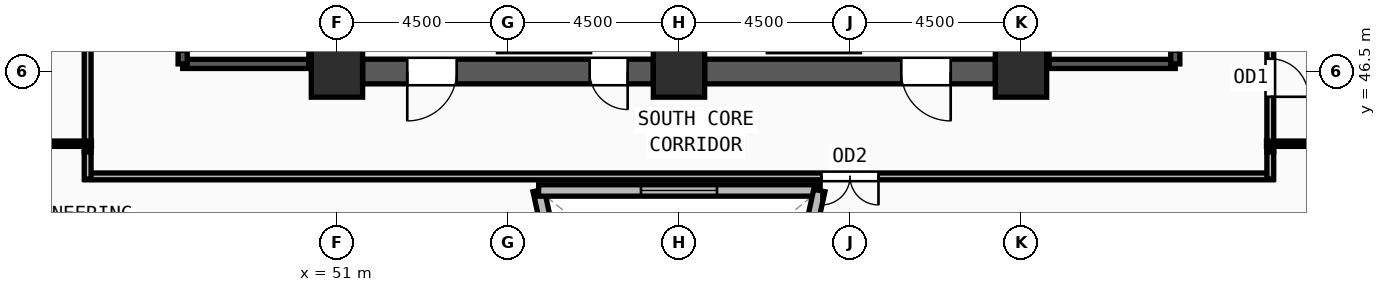
"""IFC4 building model, lengths in metres.
Left out: names, types, materials, properties, quantities, classifications, styles, units other than length and angle.
Written with IfcOpenShell. Run it as: python <this file> out.ifc"""

import sys

from ifc_helpers import new_model, si_unit, direction, frame, frame_2d, origin, origin_2d, place, context, subcontext, project, spatial, rectangle, extrude, source, transform, mapped, element, fill, save


model = new_model("IFC4")
c1 = context("Model", 3, precision=1e-05, world=origin(), true_north=direction((0.0, 1.0)))
c2 = subcontext(c1, "Body", "Model", "MODEL_VIEW")
j1 = project(units=[si_unit("LENGTHUNIT", "METRE"), si_unit("PLANEANGLEUNIT", "RADIAN")], contexts=[c1])
p1 = place(None, origin())
s1 = spatial("IfcSite", under=j1, at=p1, CompositionType="ELEMENT")
p2 = place(p1, origin())
s2 = spatial("IfcBuilding", under=s1, at=p2, CompositionType="ELEMENT")
p3 = place(p2, frame((0.0, 0.0, 236.25)))
s3 = spatial("IfcBuildingStorey", under=s2, at=p3, CompositionType="ELEMENT", Elevation=236.25)
m1 = source(origin(), c2, "Body", "SweptSolid", [
    extrude(rectangle(XDim=1.35, YDim=1.35, at=origin_2d()), origin(), (0.0, 0.0, 1.0), 3.75),
])
for number, where, z_axis, x_axis in (
    (1, (51.0, 46.5, 0.0), (0.0, 0.0, 1.0), (1.0, 0.0, 0.0)),
    (2, (60.0, 46.5, 0.0), (0.0, 0.0, 1.0), (1.0, 0.0, 0.0)),
    (3, (69.0, 46.5, 0.0), (0.0, 0.0, 1.0), (1.0, 0.0, 0.0)),
):
    element("IfcColumn", number, at=place(p3, frame(where, z_axis=z_axis, x_axis=x_axis)), inside=s3, PredefinedType="COLUMN", context=c2, shape_type="MappedRepresentation", body=[
        mapped(m1, transform((0.0, 0.0, 0.0), x_axis=(1.0, 0.0, 0.0), y_axis=(0.0, 1.0, 0.0), z_axis=(0.0, 0.0, 1.0), scale=1.0)),
    ])
p4 = place(p3, frame((38.641, 43.835, 0.0), z_axis=(0.0, 0.0, 1.0), x_axis=(0.553942197413, -0.83255512846, 0.0)))
e4 = element("IfcWall", 4, at=p4, inside=s3, PredefinedType="SOLIDWALL", context=c2, shape_type="SweptSolid", body=[
    extrude(rectangle(XDim=28.402, YDim=0.38, at=frame_2d((14.201, 0.0))), origin(), (0.0, 0.0, 1.0), 3.57),
])
m2 = source(origin(), c2, "Body", "SweptSolid", [
    extrude(rectangle(XDim=1.5, YDim=1.9, at=frame_2d((0.75, 0.95))), frame((0.0, 0.2, 0.0), z_axis=(0.0, -1.0, 0.0), x_axis=(1.0, 0.0, 0.0)), (0.0, 0.0, 1.0), 0.4),
])
p5 = place(p4, frame((6.35, 0.0, 0.55)))
e5 = element("IfcOpeningElement", 5, at=p5, cuts=e4, PredefinedType="OPENING", context=c2, shape_type="MappedRepresentation", body=[
    mapped(m2, transform((0.0, 0.0, 0.0), x_axis=(1.0, 0.0, 0.0), y_axis=(0.0, 1.0, 0.0), z_axis=(0.0, 0.0, 1.0), scale=1.0)),
])
p6 = place(p4, frame((13.451, 0.0, 0.55)))
e6 = element("IfcOpeningElement", 6, at=p6, cuts=e4, PredefinedType="OPENING", context=c2, shape_type="MappedRepresentation", body=[
    mapped(m2, transform((0.0, 0.0, 0.0), x_axis=(1.0, 0.0, 0.0), y_axis=(0.0, 1.0, 0.0), z_axis=(0.0, 0.0, 1.0), scale=1.0)),
])
p7 = place(p4, frame((20.551, 0.0, 0.55)))
e7 = element("IfcOpeningElement", 7, at=p7, cuts=e4, PredefinedType="OPENING", context=c2, shape_type="MappedRepresentation", body=[
    mapped(m2, transform((0.0, 0.0, 0.0), x_axis=(1.0, 0.0, 0.0), y_axis=(0.0, 1.0, 0.0), z_axis=(0.0, 0.0, 1.0), scale=1.0)),
])
p8 = place(p3, frame((68.325, 46.5, 0.0), z_axis=(0.0, 0.0, 1.0), x_axis=(-1.0, 0.0, 0.0)))
e8 = element("IfcWall", 8, at=p8, inside=s3, PredefinedType="SHEAR", context=c2, shape_type="SweptSolid", body=[
    extrude(rectangle(XDim=7.65, YDim=0.65, at=frame_2d((3.825, 0.0))), origin(), (0.0, 0.0, 1.0), 3.57),
])
m3 = source(origin(), c2, "Body", "SweptSolid", [
    extrude(rectangle(XDim=1.3, YDim=2.2, at=frame_2d((0.65, 1.1))), frame((0.0, 0.335, 0.0), z_axis=(0.0, -1.0, 0.0), x_axis=(1.0, 0.0, 0.0)), (0.0, 0.0, 1.0), 0.67),
])
p9 = place(p8, frame((1.175, 0.0, 0.0)))
e9 = element("IfcOpeningElement", 9, at=p9, cuts=e8, PredefinedType="OPENING", context=c2, shape_type="MappedRepresentation", body=[
    mapped(m3, transform((0.0, 0.0, 0.0), x_axis=(1.0, 0.0, 0.0), y_axis=(0.0, 1.0, 0.0), z_axis=(0.0, 0.0, 1.0), scale=1.0)),
])
p10 = place(p3, frame((59.325, 46.5, 0.0), z_axis=(0.0, 0.0, 1.0), x_axis=(-1.0, 0.0, 0.0)))
e10 = element("IfcWall", 10, at=p10, inside=s3, PredefinedType="SHEAR", context=c2, shape_type="SweptSolid", body=[
    extrude(rectangle(XDim=7.65, YDim=0.65, at=frame_2d((3.825, 0.0))), origin(), (0.0, 0.0, 1.0), 3.57),
])
p11 = place(p10, frame((5.175, 0.0, 0.0)))
e11 = element("IfcOpeningElement", 11, at=p11, cuts=e10, PredefinedType="OPENING", context=c2, shape_type="MappedRepresentation", body=[
    mapped(m3, transform((0.0, 0.0, 0.0), x_axis=(1.0, 0.0, 0.0), y_axis=(0.0, 1.0, 0.0), z_axis=(0.0, 0.0, 1.0), scale=1.0)),
])
m4 = source(origin(), c2, "Body", "SweptSolid", [
    extrude(rectangle(XDim=1.0, YDim=2.2, at=frame_2d((0.5, 1.1))), frame((0.0, 0.335, 0.0), z_axis=(0.0, -1.0, 0.0), x_axis=(1.0, 0.0, 0.0)), (0.0, 0.0, 1.0), 0.67),
])
p12 = place(p10, frame((0.675, 0.0, 0.0)))
e12 = element("IfcOpeningElement", 12, at=p12, cuts=e10, PredefinedType="OPENING", context=c2, shape_type="MappedRepresentation", body=[
    mapped(m4, transform((0.0, 0.0, 0.0), x_axis=(1.0, 0.0, 0.0), y_axis=(0.0, 1.0, 0.0), z_axis=(0.0, 0.0, 1.0), scale=1.0)),
])
p13 = place(p3, frame((46.94, 46.7, 0.0), z_axis=(0.0, 0.0, 1.0), x_axis=(1.0, 0.0, 0.0)))
e13 = element("IfcWall", 13, at=p13, inside=s3, PredefinedType="SOLIDWALL", context=c2, shape_type="SweptSolid", body=[
    extrude(rectangle(XDim=3.44, YDim=0.24, at=frame_2d((1.72, 0.0))), origin(), (0.0, 0.0, 1.0), 3.57),
])
p14 = place(p3, frame((50.38, 46.7, 0.0), z_axis=(0.0, 0.0, 1.0), x_axis=(0.0, 1.0, 0.0)))
e14 = element("IfcWall", 14, at=p14, inside=s3, PredefinedType="SOLIDWALL", context=c2, shape_type="SweptSolid", body=[
    extrude(rectangle(XDim=7.82, YDim=0.24, at=frame_2d((3.91, 0.0))), origin(), (0.0, 0.0, 1.0), 3.57),
])
p15 = place(p3, frame((46.94, 54.52, 0.0), z_axis=(0.0, 0.0, 1.0), x_axis=(0.0, -1.0, 0.0)))
e15 = element("IfcWall", 15, at=p15, inside=s3, PredefinedType="SOLIDWALL", context=c2, shape_type="SweptSolid", body=[
    extrude(rectangle(XDim=7.82, YDim=0.24, at=frame_2d((3.91, 0.0))), origin(), (0.0, 0.0, 1.0), 3.57),
])
m5 = source(origin(), c2, "Body", "SweptSolid", [
    extrude(rectangle(XDim=1.2, YDim=2.2, at=frame_2d((0.6, 1.1))), frame((0.0, 0.13, 0.0), z_axis=(0.0, -1.0, 0.0), x_axis=(1.0, 0.0, 0.0)), (0.0, 0.0, 1.0), 0.26),
])
p16 = place(p15, frame((6.3, 0.0, 0.0)))
e16 = element("IfcOpeningElement", 16, at=p16, cuts=e15, PredefinedType="OPENING", context=c2, shape_type="MappedRepresentation", body=[
    mapped(m5, transform((0.0, 0.0, 0.0), x_axis=(1.0, 0.0, 0.0), y_axis=(0.0, 1.0, 0.0), z_axis=(0.0, 0.0, 1.0), scale=1.0)),
])
p17 = place(p3, frame((69.62, 46.7, 0.0), z_axis=(0.0, 0.0, 1.0), x_axis=(1.0, 0.0, 0.0)))
e17 = element("IfcWall", 17, at=p17, inside=s3, PredefinedType="SOLIDWALL", context=c2, shape_type="SweptSolid", body=[
    extrude(rectangle(XDim=3.44, YDim=0.24, at=frame_2d((1.72, 0.0))), origin(), (0.0, 0.0, 1.0), 3.57),
])
p18 = place(p3, frame((73.06, 46.7, 0.0), z_axis=(0.0, 0.0, 1.0), x_axis=(0.0, 1.0, 0.0)))
e18 = element("IfcWall", 18, at=p18, inside=s3, PredefinedType="SOLIDWALL", context=c2, shape_type="SweptSolid", body=[
    extrude(rectangle(XDim=7.82, YDim=0.24, at=frame_2d((3.91, 0.0))), origin(), (0.0, 0.0, 1.0), 3.57),
])
p19 = place(p18, frame((0.32, 0.0, 0.0)))
e19 = element("IfcOpeningElement", 19, at=p19, cuts=e18, PredefinedType="OPENING", context=c2, shape_type="MappedRepresentation", body=[
    mapped(m5, transform((0.0, 0.0, 0.0), x_axis=(1.0, 0.0, 0.0), y_axis=(0.0, 1.0, 0.0), z_axis=(0.0, 0.0, 1.0), scale=1.0)),
])
p20 = place(p3, frame((69.62, 54.52, 0.0), z_axis=(0.0, 0.0, 1.0), x_axis=(0.0, -1.0, 0.0)))
e20 = element("IfcWall", 20, at=p20, inside=s3, PredefinedType="SOLIDWALL", context=c2, shape_type="SweptSolid", body=[
    extrude(rectangle(XDim=7.82, YDim=0.24, at=frame_2d((3.91, 0.0))), origin(), (0.0, 0.0, 1.0), 3.57),
])
p21 = place(p3, frame((57.6, 37.393, 0.0), z_axis=(0.0, 0.0, 1.0), x_axis=(-0.211469886749, 0.977384513382, 0.0)))
e21 = element("IfcWall", 21, at=p21, inside=s3, PredefinedType="SOLIDWALL", context=c2, shape_type="SweptSolid", body=[
    extrude(rectangle(XDim=6.115, YDim=0.3, at=frame_2d((3.058, 0.0))), origin(), (0.0, 0.0, 1.0), 3.57),
])
m6 = source(origin(), c2, "Body", "SweptSolid", [
    extrude(rectangle(XDim=2.0, YDim=1.9, at=frame_2d((1.0, 0.95))), frame((0.0, 0.16, 0.0), z_axis=(0.0, -1.0, 0.0), x_axis=(1.0, 0.0, 0.0)), (0.0, 0.0, 1.0), 0.32),
])
p22 = place(p21, frame((2.058, 0.0, 0.55)))
e22 = element("IfcOpeningElement", 22, at=p22, cuts=e21, PredefinedType="OPENING", context=c2, shape_type="MappedRepresentation", body=[
    mapped(m6, transform((0.0, 0.0, 0.0), x_axis=(1.0, 0.0, 0.0), y_axis=(0.0, 1.0, 0.0), z_axis=(0.0, 0.0, 1.0), scale=1.0)),
])
p23 = place(p3, frame((56.307, 43.37, 0.0), z_axis=(0.0, 0.0, 1.0), x_axis=(1.0, 0.0, 0.0)))
e23 = element("IfcWall", 23, at=p23, inside=s3, PredefinedType="SOLIDWALL", context=c2, shape_type="SweptSolid", body=[
    extrude(rectangle(XDim=7.386, YDim=0.3, at=frame_2d((3.693, 0.0))), origin(), (0.0, 0.0, 1.0), 3.57),
])
p24 = place(p23, frame((2.693, 0.0, 0.55)))
e24 = element("IfcOpeningElement", 24, at=p24, cuts=e23, PredefinedType="OPENING", context=c2, shape_type="MappedRepresentation", body=[
    mapped(m6, transform((0.0, 0.0, 0.0), x_axis=(1.0, 0.0, 0.0), y_axis=(0.0, 1.0, 0.0), z_axis=(0.0, 0.0, 1.0), scale=1.0)),
])
p25 = place(p3, frame((63.693, 43.37, 0.0), z_axis=(0.0, 0.0, 1.0), x_axis=(-0.211469886749, -0.977384513382, 0.0)))
e25 = element("IfcWall", 25, at=p25, inside=s3, PredefinedType="SOLIDWALL", context=c2, shape_type="SweptSolid", body=[
    extrude(rectangle(XDim=6.115, YDim=0.3, at=frame_2d((3.058, 0.0))), origin(), (0.0, 0.0, 1.0), 3.57),
])
p26 = place(p25, frame((2.058, 0.0, 0.55)))
e26 = element("IfcOpeningElement", 26, at=p26, cuts=e25, PredefinedType="OPENING", context=c2, shape_type="MappedRepresentation", body=[
    mapped(m6, transform((0.0, 0.0, 0.0), x_axis=(1.0, 0.0, 0.0), y_axis=(0.0, 1.0, 0.0), z_axis=(0.0, 0.0, 1.0), scale=1.0)),
])
p27 = place(p3, frame((75.63, 43.74, 0.0), z_axis=(0.0, 0.0, 1.0), x_axis=(-1.0, 0.0, 0.0)))
e27 = element("IfcWall", 27, at=p27, inside=s3, PredefinedType="PARTITIONING", context=c2, shape_type="SweptSolid", body=[
    extrude(rectangle(XDim=31.26, YDim=0.18, at=frame_2d((15.63, 0.0))), origin(), (0.0, 0.0, 1.0), 3.57),
])
m7 = source(origin(), c2, "Body", "SweptSolid", [
    extrude(rectangle(XDim=1.5, YDim=2.2, at=frame_2d((0.75, 1.1))), frame((0.0, 0.1, 0.0), z_axis=(0.0, -1.0, 0.0), x_axis=(1.0, 0.0, 0.0)), (0.0, 0.0, 1.0), 0.2),
])
p28 = place(p27, frame((10.38, 0.0, 0.0)))
e28 = element("IfcOpeningElement", 28, at=p28, cuts=e27, PredefinedType="OPENING", context=c2, shape_type="MappedRepresentation", body=[
    mapped(m7, transform((0.0, 0.0, 0.0), x_axis=(1.0, 0.0, 0.0), y_axis=(0.0, 1.0, 0.0), z_axis=(0.0, 0.0, 1.0), scale=1.0)),
])
p29 = place(p3, frame((75.56, 48.285, 0.0), z_axis=(0.0, 0.0, 1.0), x_axis=(0.0, -1.0, 0.0)))
e29 = element("IfcWall", 29, at=p29, inside=s3, PredefinedType="PARTITIONING", context=c2, shape_type="SweptSolid", body=[
    extrude(rectangle(XDim=3.9, YDim=0.18, at=frame_2d((1.95, 0.0))), origin(), (0.0, 0.0, 1.0), 3.57),
])
m8 = source(origin(), c2, "Body", "SweptSolid", [
    extrude(rectangle(XDim=1.0, YDim=2.2, at=frame_2d((0.5, 1.1))), frame((0.0, 0.1, 0.0), z_axis=(0.0, -1.0, 0.0), x_axis=(1.0, 0.0, 0.0)), (0.0, 0.0, 1.0), 0.2),
])
p30 = place(p29, frame((1.45, 0.0, 0.0)))
e30 = element("IfcOpeningElement", 30, at=p30, cuts=e29, PredefinedType="OPENING", context=c2, shape_type="MappedRepresentation", body=[
    mapped(m8, transform((0.0, 0.0, 0.0), x_axis=(1.0, 0.0, 0.0), y_axis=(0.0, 1.0, 0.0), z_axis=(0.0, 0.0, 1.0), scale=1.0)),
])
p31 = place(p3, frame((44.44, 44.385, 0.0), z_axis=(0.0, 0.0, 1.0), x_axis=(0.0, 1.0, 0.0)))
e31 = element("IfcWall", 31, at=p31, inside=s3, PredefinedType="PARTITIONING", context=c2, shape_type="SweptSolid", body=[
    extrude(rectangle(XDim=3.825, YDim=0.18, at=frame_2d((1.913, 0.0))), origin(), (0.0, 0.0, 1.0), 3.57),
])
for number, where, z_axis, x_axis in (
    (32, (44.44, 43.67, 0.0), (0.0, 0.0, 1.0), (0.0, 1.0, 0.0)),
    (33, (75.56, 44.385, 0.0), (0.0, 0.0, 1.0), (0.0, -1.0, 0.0)),
):
    element("IfcWall", number, at=place(p3, frame(where, z_axis=z_axis, x_axis=x_axis)), inside=s3, PredefinedType="PARTITIONING", context=c2, shape_type="SweptSolid", body=[
        extrude(rectangle(XDim=0.715, YDim=0.18, at=frame_2d((0.357, 0.0))), origin(), (0.0, 0.0, 1.0), 3.57),
    ])
p32 = place(p3, frame((44.54, 44.6, 0.0), z_axis=(0.0, 0.0, 1.0), x_axis=(-1.0, 0.0, 0.0)))
e34 = element("IfcWall", 34, at=p32, inside=s3, PredefinedType="PARTITIONING", context=c2, shape_type="SweptSolid", body=[
    extrude(rectangle(XDim=7.061, YDim=0.14, at=frame_2d((3.531, 0.0))), origin(), (0.0, 0.0, 1.0), 3.57),
])
p33 = place(p3, frame((75.46, 44.6, 0.0), z_axis=(0.0, 0.0, 1.0), x_axis=(1.0, 0.0, 0.0)))
e35 = element("IfcWall", 35, at=p33, inside=s3, PredefinedType="PARTITIONING", context=c2, shape_type="SweptSolid", body=[
    extrude(rectangle(XDim=6.716, YDim=0.14, at=frame_2d((3.358, 0.0))), origin(), (0.0, 0.0, 1.0), 3.57),
])
m9 = source(origin(), c2, "Body", "SweptSolid", [
    extrude(rectangle(XDim=1.3, YDim=2.2, at=frame_2d((0.65, 1.1))), frame((0.0, 0.025, 0.0), z_axis=(0.0, -1.0, 0.0), x_axis=(1.0, 0.0, 0.0)), (0.0, 0.0, 1.0), 0.05),
])
p34 = place(p11, origin())
e36 = element("IfcDoor", 36, at=p34, inside=s3, OperationType="SINGLE_SWING_RIGHT", PredefinedType="DOOR", context=c2, shape_type="MappedRepresentation", body=[
    mapped(m9, transform((0.0, 0.0, 0.0), x_axis=(1.0, 0.0, 0.0), y_axis=(0.0, 1.0, 0.0), z_axis=(0.0, 0.0, 1.0), scale=1.0)),
])
fill(e11, e36)
m10 = source(origin(), c2, "Body", "SweptSolid", [
    extrude(rectangle(XDim=1.0, YDim=2.2, at=frame_2d((0.5, 1.1))), frame((0.0, 0.025, 0.0), z_axis=(0.0, -1.0, 0.0), x_axis=(1.0, 0.0, 0.0)), (0.0, 0.0, 1.0), 0.05),
])
p35 = place(p12, origin())
e37 = element("IfcDoor", 37, at=p35, inside=s3, OperationType="SINGLE_SWING_LEFT", PredefinedType="DOOR", context=c2, shape_type="MappedRepresentation", body=[
    mapped(m10, transform((0.0, 0.0, 0.0), x_axis=(1.0, 0.0, 0.0), y_axis=(0.0, 1.0, 0.0), z_axis=(0.0, 0.0, 1.0), scale=1.0)),
])
fill(e12, e37)
p36 = place(p9, origin())
e38 = element("IfcDoor", 38, at=p36, inside=s3, OperationType="SINGLE_SWING_LEFT", PredefinedType="DOOR", context=c2, shape_type="MappedRepresentation", body=[
    mapped(m9, transform((0.0, 0.0, 0.0), x_axis=(1.0, 0.0, 0.0), y_axis=(0.0, 1.0, 0.0), z_axis=(0.0, 0.0, 1.0), scale=1.0)),
])
fill(e9, e38)
m11 = source(origin(), c2, "Body", "SweptSolid", [
    extrude(rectangle(XDim=2.0, YDim=1.9, at=frame_2d((1.0, 0.95))), frame((0.0, 0.03, 0.0), z_axis=(0.0, -1.0, 0.0), x_axis=(1.0, 0.0, 0.0)), (0.0, 0.0, 1.0), 0.06),
])
p37 = place(p24, origin())
e39 = element("IfcWindow", 39, at=p37, inside=s3, PartitioningType="DOUBLE_PANEL_VERTICAL", PredefinedType="WINDOW", context=c2, shape_type="MappedRepresentation", body=[
    mapped(m11, transform((0.0, 0.0, 0.0), x_axis=(1.0, 0.0, 0.0), y_axis=(0.0, 1.0, 0.0), z_axis=(0.0, 0.0, 1.0), scale=1.0)),
])
fill(e24, e39)
m12 = source(origin(), c2, "Body", "SweptSolid", [
    extrude(rectangle(XDim=1.5, YDim=2.2, at=frame_2d((0.75, 1.1))), frame((0.0, 0.025, 0.0), z_axis=(0.0, -1.0, 0.0), x_axis=(1.0, 0.0, 0.0)), (0.0, 0.0, 1.0), 0.05),
])
p38 = place(p28, origin())
e40 = element("IfcDoor", 40, at=p38, inside=s3, OperationType="DOUBLE_DOOR_SINGLE_SWING", PredefinedType="DOOR", context=c2, shape_type="MappedRepresentation", body=[
    mapped(m12, transform((0.0, 0.0, 0.0), x_axis=(1.0, 0.0, 0.0), y_axis=(0.0, 1.0, 0.0), z_axis=(0.0, 0.0, 1.0), scale=1.0)),
])
fill(e28, e40)
p39 = place(p30, origin())
e41 = element("IfcDoor", 41, at=p39, inside=s3, OperationType="SINGLE_SWING_RIGHT", PredefinedType="DOOR", context=c2, shape_type="MappedRepresentation", body=[
    mapped(m10, transform((0.0, 0.0, 0.0), x_axis=(1.0, 0.0, 0.0), y_axis=(0.0, 1.0, 0.0), z_axis=(0.0, 0.0, 1.0), scale=1.0)),
])
fill(e30, e41)
save(model, sys.argv[1])
